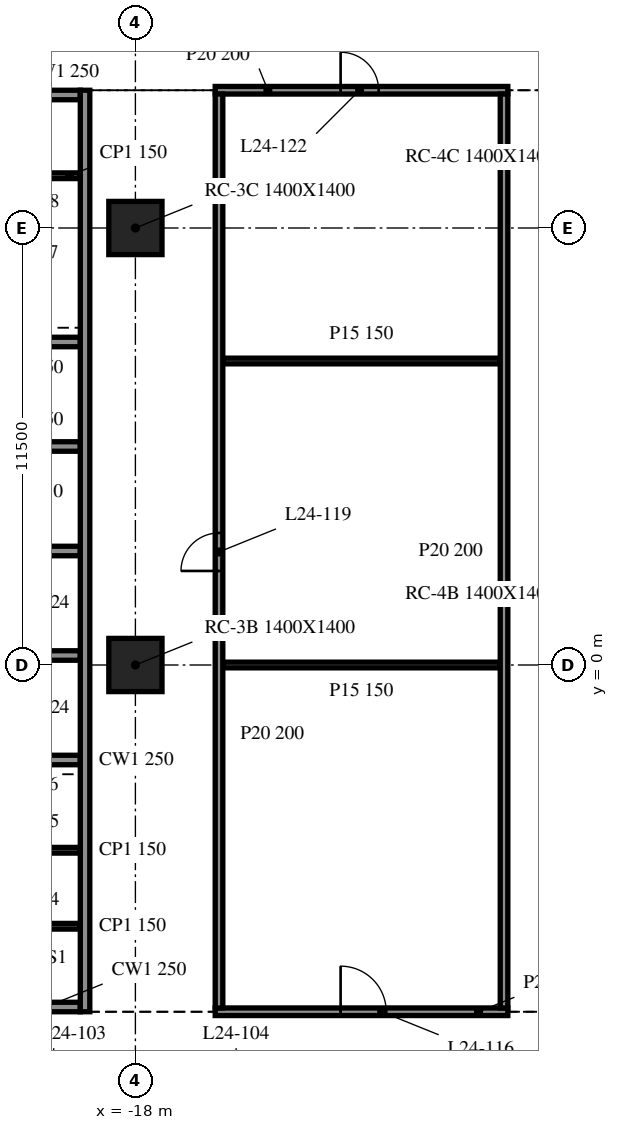
"""IFC4 building model, lengths in metres.
Left out: names, types, materials, properties, quantities, classifications, styles, units other than length and angle.
Written with IfcOpenShell. Run it as: python <this file> out.ifc"""

import sys

from ifc_helpers import new_model, si_unit, direction, frame, frame_2d, origin, origin_2d, place, context, subcontext, project, spatial, rectangle, extrude, element, fill, save


model = new_model("IFC4")
c1 = context("Model", 3, precision=1e-05, world=origin(), true_north=direction((0.0, 1.0)))
c2 = subcontext(c1, "Body", "Model", "MODEL_VIEW")
j1 = project(units=[si_unit("LENGTHUNIT", "METRE"), si_unit("PLANEANGLEUNIT", "RADIAN")], contexts=[c1])
p1 = place(None, origin())
s1 = spatial("IfcSite", under=j1, at=p1, CompositionType="ELEMENT")
p2 = place(p1, origin())
s2 = spatial("IfcBuilding", under=s1, at=p2, CompositionType="ELEMENT")
p3 = place(p2, frame((0.0, 0.0, 105.3)))
s3 = spatial("IfcBuildingStorey", under=s2, at=p3, CompositionType="ELEMENT", Elevation=105.3)
for number, where, z_axis, x_axis in (
    (1, (-18.0, 0.0, -0.34), (0.0, 0.0, 1.0), (1.0, 0.0, 0.0)),
    (2, (-18.0, 11.5, -0.34), (0.0, 0.0, 1.0), (1.0, 0.0, 0.0)),
):
    element("IfcColumn", number, at=place(p3, frame(where, z_axis=z_axis, x_axis=x_axis)), inside=s3, PredefinedType="COLUMN", context=c2, shape_type="SweptSolid", body=[
        extrude(rectangle(XDim=1.4, YDim=1.4, at=origin_2d()), origin(), (0.0, 0.0, 1.0), 4.1),
    ])
p4 = place(p3, frame((-19.325, -9.125, 0.0), z_axis=(0.0, 0.0, 1.0), x_axis=(0.0, 1.0, 0.0)))
e3 = element("IfcWall", 3, at=p4, inside=s3, PredefinedType="SOLIDWALL", context=c2, shape_type="SweptSolid", body=[
    extrude(rectangle(XDim=24.25, YDim=0.25, at=frame_2d((12.125, 0.0))), origin(), (0.0, 0.0, 1.0), 3.76),
])
p5 = place(p3, frame((-19.45, -9.0, 0.0), z_axis=(0.0, 0.0, 1.0), x_axis=(-1.0, 0.0, 0.0)))
e4 = element("IfcWall", 4, at=p5, inside=s3, PredefinedType="SOLIDWALL", context=c2, shape_type="SweptSolid", body=[
    extrude(rectangle(XDim=9.1, YDim=0.25, at=frame_2d((4.55, 0.0))), origin(), (0.0, 0.0, 1.0), 3.76),
])
p6 = place(p5, frame((3.65, 0.0, 0.0)))
e5 = element("IfcOpeningElement", 5, at=p6, cuts=e4, PredefinedType="OPENING", context=c2, shape_type="SweptSolid", body=[
    extrude(rectangle(XDim=1.8, YDim=2.1, at=frame_2d((0.9, 1.05))), frame((0.0, 0.135, 0.0), z_axis=(0.0, -1.0, 0.0), x_axis=(1.0, 0.0, 0.0)), (0.0, 0.0, 1.0), 0.27),
])
p7 = place(p3, frame((-28.55, 15.0, 0.0), z_axis=(0.0, 0.0, 1.0), x_axis=(1.0, 0.0, 0.0)))
e6 = element("IfcWall", 6, at=p7, inside=s3, PredefinedType="SOLIDWALL", context=c2, shape_type="SweptSolid", body=[
    extrude(rectangle(XDim=9.1, YDim=0.25, at=frame_2d((4.55, 0.0))), origin(), (0.0, 0.0, 1.0), 3.76),
])
p8 = place(p7, frame((3.65, 0.0, 0.0)))
e7 = element("IfcOpeningElement", 7, at=p8, cuts=e6, PredefinedType="OPENING", context=c2, shape_type="SweptSolid", body=[
    extrude(rectangle(XDim=1.8, YDim=2.1, at=frame_2d((0.9, 1.05))), frame((0.0, 0.135, 0.0), z_axis=(0.0, -1.0, 0.0), x_axis=(1.0, 0.0, 0.0)), (0.0, 0.0, 1.0), 0.27),
])
for number, where, z_axis, x_axis in (
    (8, (-22.3, -2.5, 0.0), (0.0, 0.0, 1.0), (1.0, 0.0, 0.0)),
    (9, (-22.3, 0.25, 0.0), (0.0, 0.0, 1.0), (1.0, 0.0, 0.0)),
    (10, (-22.3, 3.0, 0.0), (0.0, 0.0, 1.0), (1.0, 0.0, 0.0)),
    (11, (-22.3, 5.75, 0.0), (0.0, 0.0, 1.0), (1.0, 0.0, 0.0)),
    (12, (-22.3, 8.5, 0.0), (0.0, 0.0, 1.0), (1.0, 0.0, 0.0)),
):
    element("IfcWall", number, at=place(p3, frame(where, z_axis=z_axis, x_axis=x_axis)), inside=s3, PredefinedType="SOLIDWALL", context=c2, shape_type="SweptSolid", body=[
        extrude(rectangle(XDim=2.85, YDim=0.25, at=frame_2d((1.425, 0.0))), origin(), (0.0, 0.0, 1.0), 3.76),
    ])
for number, where, z_axis, x_axis in (
    (13, (-22.3, -6.875, 0.0), (0.0, 0.0, 1.0), (1.0, 0.0, 0.0)),
    (14, (-22.3, -4.875, 0.0), (0.0, 0.0, 1.0), (1.0, 0.0, 0.0)),
    (15, (-22.3, 12.875, 0.0), (0.0, 0.0, 1.0), (1.0, 0.0, 0.0)),
):
    element("IfcWall", number, at=place(p3, frame(where, z_axis=z_axis, x_axis=x_axis)), inside=s3, PredefinedType="PARTITIONING", context=c2, shape_type="SweptSolid", body=[
        extrude(rectangle(XDim=2.85, YDim=0.15, at=frame_2d((1.425, 0.0))), origin(), (0.0, 0.0, 1.0), 3.76),
    ])
p9 = place(p3, frame((-15.9, -9.125, 0.0), z_axis=(0.0, 0.0, 1.0), x_axis=(1.0, 0.0, 0.0)))
e16 = element("IfcWall", 16, at=p9, inside=s3, PredefinedType="PARTITIONING", context=c2, shape_type="SweptSolid", body=[
    extrude(rectangle(XDim=7.7, YDim=0.2, at=frame_2d((3.85, 0.0))), origin(), (0.0, 0.0, 1.0), 3.76),
])
p10 = place(p9, frame((3.3, 0.0, 0.0)))
e17 = element("IfcOpeningElement", 17, at=p10, cuts=e16, PredefinedType="OPENING", context=c2, shape_type="SweptSolid", body=[
    extrude(rectangle(XDim=1.2, YDim=2.1, at=frame_2d((0.6, 1.05))), frame((0.0, 0.11, 0.0), z_axis=(0.0, -1.0, 0.0), x_axis=(1.0, 0.0, 0.0)), (0.0, 0.0, 1.0), 0.22),
])
for number, where, z_axis, x_axis in (
    (18, (-15.7, 0.0, 0.0), (0.0, 0.0, 1.0), (1.0, 0.0, 0.0)),
    (19, (-15.7, 8.0, 0.0), (0.0, 0.0, 1.0), (1.0, 0.0, 0.0)),
):
    element("IfcWall", number, at=place(p3, frame(where, z_axis=z_axis, x_axis=x_axis)), inside=s3, PredefinedType="PARTITIONING", context=c2, shape_type="SweptSolid", body=[
        extrude(rectangle(XDim=7.3, YDim=0.15, at=frame_2d((3.65, 0.0))), origin(), (0.0, 0.0, 1.0), 3.76),
    ])
p11 = place(p3, frame((-15.9, 15.125, 0.0), z_axis=(0.0, 0.0, 1.0), x_axis=(1.0, 0.0, 0.0)))
e20 = element("IfcWall", 20, at=p11, inside=s3, PredefinedType="PARTITIONING", context=c2, shape_type="SweptSolid", body=[
    extrude(rectangle(XDim=7.7, YDim=0.2, at=frame_2d((3.85, 0.0))), origin(), (0.0, 0.0, 1.0), 3.76),
])
p12 = place(p11, frame((3.3, 0.0, 0.0)))
e21 = element("IfcOpeningElement", 21, at=p12, cuts=e20, PredefinedType="OPENING", context=c2, shape_type="SweptSolid", body=[
    extrude(rectangle(XDim=1.0, YDim=2.1, at=frame_2d((0.5, 1.05))), frame((0.0, 0.11, 0.0), z_axis=(0.0, -1.0, 0.0), x_axis=(1.0, 0.0, 0.0)), (0.0, 0.0, 1.0), 0.22),
])
p13 = place(p3, frame((-15.8, -9.025, 0.0), z_axis=(0.0, 0.0, 1.0), x_axis=(0.0, 1.0, 0.0)))
e22 = element("IfcWall", 22, at=p13, inside=s3, PredefinedType="PARTITIONING", context=c2, shape_type="SweptSolid", body=[
    extrude(rectangle(XDim=24.05, YDim=0.2, at=frame_2d((12.025, 0.0))), origin(), (0.0, 0.0, 1.0), 3.76),
])
p14 = place(p13, frame((11.5, 0.0, 0.0)))
e23 = element("IfcOpeningElement", 23, at=p14, cuts=e22, PredefinedType="OPENING", context=c2, shape_type="SweptSolid", body=[
    extrude(rectangle(XDim=1.0, YDim=2.1, at=frame_2d((0.5, 1.05))), frame((0.0, 0.11, 0.0), z_axis=(0.0, -1.0, 0.0), x_axis=(1.0, 0.0, 0.0)), (0.0, 0.0, 1.0), 0.22),
])
p15 = place(p3, frame((-8.3, -9.025, 0.0), z_axis=(0.0, 0.0, 1.0), x_axis=(0.0, 1.0, 0.0)))
e24 = element("IfcWall", 24, at=p15, inside=s3, PredefinedType="PARTITIONING", context=c2, shape_type="SweptSolid", body=[
    extrude(rectangle(XDim=24.05, YDim=0.2, at=frame_2d((12.025, 0.0))), origin(), (0.0, 0.0, 1.0), 3.76),
])
p16 = place(p10, origin())
e25 = element("IfcDoor", 25, at=p16, inside=s3, OperationType="SINGLE_SWING_RIGHT", PredefinedType="DOOR", context=c2, shape_type="SweptSolid", body=[
    extrude(rectangle(XDim=1.2, YDim=2.1, at=frame_2d((0.6, 1.05))), frame((0.0, 0.025, 0.0), z_axis=(0.0, -1.0, 0.0), x_axis=(1.0, 0.0, 0.0)), (0.0, 0.0, 1.0), 0.05),
])
fill(e17, e25)
p17 = place(p14, origin())
e26 = element("IfcDoor", 26, at=p17, inside=s3, OperationType="SINGLE_SWING_RIGHT", PredefinedType="DOOR", context=c2, shape_type="SweptSolid", body=[
    extrude(rectangle(XDim=1.0, YDim=2.1, at=frame_2d((0.5, 1.05))), frame((0.0, 0.025, 0.0), z_axis=(0.0, -1.0, 0.0), x_axis=(1.0, 0.0, 0.0)), (0.0, 0.0, 1.0), 0.05),
])
fill(e23, e26)
p18 = place(p12, origin())
e27 = element("IfcDoor", 27, at=p18, inside=s3, OperationType="SINGLE_SWING_RIGHT", PredefinedType="DOOR", context=c2, shape_type="SweptSolid", body=[
    extrude(rectangle(XDim=1.0, YDim=2.1, at=frame_2d((0.5, 1.05))), frame((0.0, 0.025, 0.0), z_axis=(0.0, -1.0, 0.0), x_axis=(1.0, 0.0, 0.0)), (0.0, 0.0, 1.0), 0.05),
])
fill(e21, e27)
save(model, sys.argv[1])
